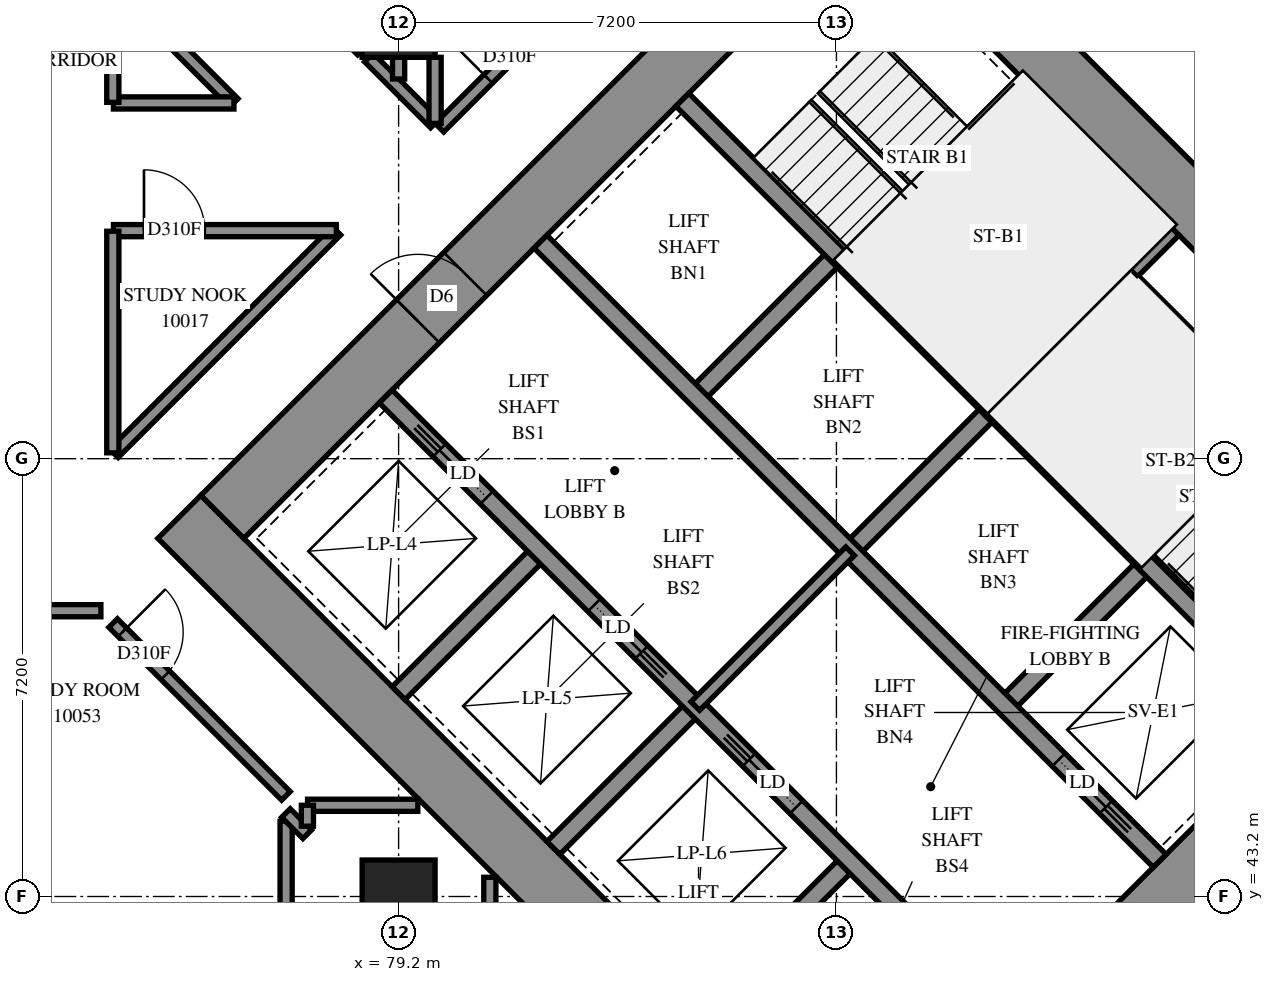
"""IFC4 building model, lengths in metres.
Left out: names, types, materials, properties, quantities, classifications, styles, units other than length and angle.
Written with IfcOpenShell. Run it as: python <this file> out.ifc"""

import sys

from ifc_helpers import new_model, si_unit, direction, frame, frame_2d, origin, origin_2d, place, context, subcontext, project, spatial, rectangle, extrude, element, fill, save


model = new_model("IFC4")
c1 = context("Model", 3, precision=1e-05, world=origin(), true_north=direction((0.0, 1.0)))
c2 = subcontext(c1, "Body", "Model", "MODEL_VIEW")
j1 = project(units=[si_unit("LENGTHUNIT", "METRE"), si_unit("PLANEANGLEUNIT", "RADIAN")], contexts=[c1])
p1 = place(None, origin())
s1 = spatial("IfcSite", under=j1, at=p1, CompositionType="ELEMENT")
p2 = place(p1, origin())
s2 = spatial("IfcBuilding", under=s1, at=p2, CompositionType="ELEMENT")
p3 = place(p2, frame((0.0, 0.0, 40.6)))
s3 = spatial("IfcBuildingStorey", under=s2, at=p3, CompositionType="ELEMENT", Elevation=40.6)
for number, where, z_axis, x_axis in (
    (1, (79.2, 43.2, 0.0), (0.0, 0.0, 1.0), (1.0, 0.0, 0.0)),
    (2, (79.2, 57.6, 0.0), (0.0, 0.0, 1.0), (1.0, 0.0, 0.0)),
):
    element("IfcColumn", number, at=place(p3, frame(where, z_axis=z_axis, x_axis=x_axis)), inside=s3, PredefinedType="COLUMN", context=c2, shape_type="SweptSolid", body=[
        extrude(rectangle(XDim=1.2, YDim=1.2, at=origin_2d()), origin(), (0.0, 0.0, 1.0), 3.1),
    ])
p4 = place(p3, frame((75.594, 49.443, -0.3), z_axis=(0.0, 0.0, 1.0), x_axis=(0.7071037324, -0.70710983, 0.0)))
e3 = element("IfcWall", 3, at=p4, inside=s3, PredefinedType="SHEAR", context=c2, shape_type="SweptSolid", body=[
    extrude(rectangle(XDim=16.4, YDim=1.0, at=frame_2d((8.2, 0.0))), origin(), (0.0, 0.0, 1.0), 2.7),
])
p5 = place(p3, frame((86.483, 60.333, -0.3), z_axis=(0.0, 0.0, 1.0), x_axis=(0.70710983, -0.7071037324, 0.0)))
e4 = element("IfcWall", 4, at=p5, inside=s3, PredefinedType="SHEAR", context=c2, shape_type="SweptSolid", body=[
    extrude(rectangle(XDim=16.4, YDim=1.0, at=frame_2d((8.2, 0.0))), origin(), (0.0, 0.0, 1.0), 2.7),
])
p6 = place(p5, frame((11.0, 0.0, 0.3)))
e5 = element("IfcOpeningElement", 5, at=p6, cuts=e4, PredefinedType="OPENING", context=c2, shape_type="SweptSolid", body=[
    extrude(rectangle(XDim=0.8, YDim=2.1, at=frame_2d((0.4, 1.05))), frame((0.0, 0.51, 0.0), z_axis=(0.0, -1.0, 0.0), x_axis=(1.0, 0.0, 0.0)), (0.0, 0.0, 1.0), 1.02),
])
p7 = place(p3, frame((76.301, 49.443, -0.3), z_axis=(0.0, 0.0, 1.0), x_axis=(0.7071067812, 0.7071067812, 0.0)))
e6 = element("IfcWall", 6, at=p7, inside=s3, PredefinedType="SHEAR", context=c2, shape_type="SweptSolid", body=[
    extrude(rectangle(XDim=14.4, YDim=1.0, at=frame_2d((7.2, 0.0))), origin(), (0.0, 0.0, 1.0), 2.7),
])
p8 = place(p7, frame((4.55, 0.0, 0.3)))
e7 = element("IfcOpeningElement", 7, at=p8, cuts=e6, PredefinedType="OPENING", context=c2, shape_type="SweptSolid", body=[
    extrude(rectangle(XDim=1.1, YDim=2.1, at=frame_2d((0.55, 1.05))), frame((0.0, 0.51, 0.0), z_axis=(0.0, -1.0, 0.0), x_axis=(1.0, 0.0, 0.0)), (0.0, 0.0, 1.0), 1.02),
])
p9 = place(p7, frame((11.35, 0.0, 0.3)))
e8 = element("IfcOpeningElement", 8, at=p9, cuts=e6, PredefinedType="OPENING", context=c2, shape_type="SweptSolid", body=[
    extrude(rectangle(XDim=1.1, YDim=2.1, at=frame_2d((0.55, 1.05))), frame((0.0, 0.51, 0.0), z_axis=(0.0, -1.0, 0.0), x_axis=(1.0, 0.0, 0.0)), (0.0, 0.0, 1.0), 1.02),
])
p10 = place(p3, frame((87.19, 38.554, -0.3), z_axis=(0.0, 0.0, 1.0), x_axis=(0.707103309, 0.7071102534, 0.0)))
e9 = element("IfcWall", 9, at=p10, inside=s3, PredefinedType="SHEAR", context=c2, shape_type="SweptSolid", body=[
    extrude(rectangle(XDim=14.4, YDim=1.0, at=frame_2d((7.2, 0.0))), origin(), (0.0, 0.0, 1.0), 2.7),
])
p11 = place(p10, frame((4.55, 0.0, 0.3)))
e10 = element("IfcOpeningElement", 10, at=p11, cuts=e9, PredefinedType="OPENING", context=c2, shape_type="SweptSolid", body=[
    extrude(rectangle(XDim=1.1, YDim=2.1, at=frame_2d((0.55, 1.05))), frame((0.0, 0.51, 0.0), z_axis=(0.0, -1.0, 0.0), x_axis=(1.0, 0.0, 0.0)), (0.0, 0.0, 1.0), 1.02),
])
p12 = place(p10, frame((11.35, 0.0, 0.3)))
e11 = element("IfcOpeningElement", 11, at=p12, cuts=e9, PredefinedType="OPENING", context=c2, shape_type="SweptSolid", body=[
    extrude(rectangle(XDim=1.1, YDim=2.1, at=frame_2d((0.55, 1.05))), frame((0.0, 0.51, 0.0), z_axis=(0.0, -1.0, 0.0), x_axis=(1.0, 0.0, 0.0)), (0.0, 0.0, 1.0), 1.02),
])
for number, where, z_axis, x_axis in (
    (12, (79.2, 46.544, 0.0), (0.0, 0.0, 1.0), (0.707, 0.707, 0.0)),
    (13, (84.079, 51.423, 0.0), (0.0, 0.0, 1.0), (0.707, 0.707, 0.0)),
):
    element("IfcWall", number, at=place(p3, frame(where, z_axis=z_axis, x_axis=x_axis)), inside=s3, PredefinedType="SOLIDWALL", context=c2, shape_type="SweptSolid", body=[
        extrude(rectangle(XDim=3.3, YDim=0.3, at=frame_2d((1.65, 0.0))), origin(), (0.0, 0.0, 1.0), 3.1),
    ])
p13 = place(p3, frame((81.746, 43.999, 0.0), z_axis=(0.0, 0.0, 1.0), x_axis=(0.7071067812, 0.7071067812, 0.0)))
e14 = element("IfcWall", 14, at=p13, inside=s3, PredefinedType="SOLIDWALL", context=c2, shape_type="SweptSolid", body=[
    extrude(rectangle(XDim=3.3, YDim=0.3, at=frame_2d((1.65, 0.0))), origin(), (0.0, 0.0, 1.0), 3.1),
])
p14 = place(p3, frame((86.625, 48.878, 0.0), z_axis=(0.0, 0.0, 1.0), x_axis=(0.7071067812, 0.7071067812, 0.0)))
e15 = element("IfcWall", 15, at=p14, inside=s3, PredefinedType="SOLIDWALL", context=c2, shape_type="SweptSolid", body=[
    extrude(rectangle(XDim=3.3, YDim=0.3, at=frame_2d((1.65, 0.0))), origin(), (0.0, 0.0, 1.0), 3.1),
])
p15 = place(p3, frame((84.291, 41.453, 0.0), z_axis=(0.0, 0.0, 1.0), x_axis=(0.7071067812, 0.7071067812, 0.0)))
e16 = element("IfcWall", 16, at=p15, inside=s3, PredefinedType="SOLIDWALL", context=c2, shape_type="SweptSolid", body=[
    extrude(rectangle(XDim=3.3, YDim=0.3, at=frame_2d((1.65, 0.0))), origin(), (0.0, 0.0, 1.0), 3.1),
])
p16 = place(p3, frame((89.17, 46.332, 0.0), z_axis=(0.0, 0.0, 1.0), x_axis=(0.7071067812, 0.7071067812, 0.0)))
e17 = element("IfcWall", 17, at=p16, inside=s3, PredefinedType="SOLIDWALL", context=c2, shape_type="SweptSolid", body=[
    extrude(rectangle(XDim=3.3, YDim=0.3, at=frame_2d((1.65, 0.0))), origin(), (0.0, 0.0, 1.0), 3.1),
])
p17 = place(p3, frame((78.988, 51.423, 0.0), z_axis=(0.0, 0.0, 1.0), x_axis=(0.7071067812, -0.7071067812, 0.0)))
e18 = element("IfcWall", 18, at=p17, inside=s3, PredefinedType="SOLIDWALL", context=c2, shape_type="SweptSolid", body=[
    extrude(rectangle(XDim=14.4, YDim=0.3, at=frame_2d((7.2, 0.0))), origin(), (0.0, 0.0, 1.0), 3.1),
])
p18 = place(p17, frame((1.25, 0.0, 0.0)))
e19 = element("IfcOpeningElement", 19, at=p18, cuts=e18, PredefinedType="OPENING", context=c2, shape_type="SweptSolid", body=[
    extrude(rectangle(XDim=1.1, YDim=2.1, at=frame_2d((0.55, 1.05))), frame((0.0, 0.16, 0.0), z_axis=(0.0, -1.0, 0.0), x_axis=(1.0, 0.0, 0.0)), (0.0, 0.0, 1.0), 0.32),
])
p19 = place(p17, frame((4.85, 0.0, 0.0)))
e20 = element("IfcOpeningElement", 20, at=p19, cuts=e18, PredefinedType="OPENING", context=c2, shape_type="SweptSolid", body=[
    extrude(rectangle(XDim=1.1, YDim=2.1, at=frame_2d((0.55, 1.05))), frame((0.0, 0.16, 0.0), z_axis=(0.0, -1.0, 0.0), x_axis=(1.0, 0.0, 0.0)), (0.0, 0.0, 1.0), 0.32),
])
p20 = place(p17, frame((8.45, 0.0, 0.0)))
e21 = element("IfcOpeningElement", 21, at=p20, cuts=e18, PredefinedType="OPENING", context=c2, shape_type="SweptSolid", body=[
    extrude(rectangle(XDim=1.1, YDim=2.1, at=frame_2d((0.55, 1.05))), frame((0.0, 0.16, 0.0), z_axis=(0.0, -1.0, 0.0), x_axis=(1.0, 0.0, 0.0)), (0.0, 0.0, 1.0), 0.32),
])
p21 = place(p17, frame((12.05, 0.0, 0.0)))
e22 = element("IfcOpeningElement", 22, at=p21, cuts=e18, PredefinedType="OPENING", context=c2, shape_type="SweptSolid", body=[
    extrude(rectangle(XDim=1.1, YDim=2.1, at=frame_2d((0.55, 1.05))), frame((0.0, 0.16, 0.0), z_axis=(0.0, -1.0, 0.0), x_axis=(1.0, 0.0, 0.0)), (0.0, 0.0, 1.0), 0.32),
])
p22 = place(p3, frame((81.534, 53.969, 0.0), z_axis=(0.0, 0.0, 1.0), x_axis=(0.707103309, -0.7071102534, 0.0)))
e23 = element("IfcWall", 23, at=p22, inside=s3, PredefinedType="SOLIDWALL", context=c2, shape_type="SweptSolid", body=[
    extrude(rectangle(XDim=14.4, YDim=0.3, at=frame_2d((7.2, 0.0))), origin(), (0.0, 0.0, 1.0), 3.1),
])
p23 = place(p22, frame((12.05, 0.0, 0.0)))
e24 = element("IfcOpeningElement", 24, at=p23, cuts=e23, PredefinedType="OPENING", context=c2, shape_type="SweptSolid", body=[
    extrude(rectangle(XDim=1.1, YDim=2.1, at=frame_2d((0.55, 1.05))), frame((0.0, 0.16, 0.0), z_axis=(0.0, -1.0, 0.0), x_axis=(1.0, 0.0, 0.0)), (0.0, 0.0, 1.0), 0.32),
])
for number, where, z_axis, x_axis in (
    (25, (83.867, 56.302, 0.0), (0.0, 0.0, 1.0), (0.707, -0.707, 0.0)),
    (26, (88.958, 51.211, 0.0), (0.0, 0.0, 1.0), (0.707, -0.707, 0.0)),
):
    element("IfcWall", number, at=place(p3, frame(where, z_axis=z_axis, x_axis=x_axis)), inside=s3, PredefinedType="SOLIDWALL", context=c2, shape_type="SweptSolid", body=[
        extrude(rectangle(XDim=7.2, YDim=0.3, at=frame_2d((3.6, 0.0))), origin(), (0.0, 0.0, 1.0), 3.1),
    ])
p24 = place(p3, frame((88.958, 51.211, 0.0), z_axis=(0.0, 0.0, 1.0), x_axis=(0.7071067812, 0.7071067812, 0.0)))
e27 = element("IfcWall", 27, at=p24, inside=s3, PredefinedType="SOLIDWALL", context=c2, shape_type="SweptSolid", body=[
    extrude(rectangle(XDim=4.2, YDim=0.3, at=frame_2d((2.1, 0.0))), origin(), (0.0, 0.0, 1.0), 3.1),
])
p25 = place(p3, frame((91.313, 53.354, 0.0), z_axis=(0.0, 0.0, 1.0), x_axis=(0.7071140275, -0.7070995348, 0.0)))
e28 = element("IfcWall", 28, at=p25, inside=s3, PredefinedType="PARTITIONING", context=c2, shape_type="SweptSolid", body=[
    extrude(rectangle(XDim=6.9, YDim=0.15, at=frame_2d((3.45, 0.0))), origin(), (0.0, 0.0, 1.0), 3.1),
])
p26 = place(p3, frame((84.079, 46.332, 0.0), z_axis=(0.0, 0.0, 1.0), x_axis=(0.7071067812, 0.7071067812, 0.0)))
e29 = element("IfcWall", 29, at=p26, inside=s3, PredefinedType="PARTITIONING", context=c2, shape_type="SweptSolid", body=[
    extrude(rectangle(XDim=3.6, YDim=0.2, at=frame_2d((1.8, 0.0))), origin(), (0.0, 0.0, 1.0), 3.1),
])
p27 = place(p3, frame((55.1, 47.9, 0.0), z_axis=(0.0, 0.0, 1.0), x_axis=(1.0, 0.0, 0.0)))
e30 = element("IfcWall", 30, at=p27, inside=s3, PredefinedType="PARTITIONING", context=c2, shape_type="SweptSolid", body=[
    extrude(rectangle(XDim=19.204, YDim=0.2, at=frame_2d((9.602, 0.0))), origin(), (0.0, 0.0, 1.0), 3.1),
])
p28 = place(p27, frame((6.399, 0.0, 0.0)))
e31 = element("IfcOpeningElement", 31, at=p28, cuts=e30, PredefinedType="OPENING", context=c2, shape_type="SweptSolid", body=[
    extrude(rectangle(XDim=0.9, YDim=2.1, at=frame_2d((0.45, 1.05))), frame((0.0, 0.11, 0.0), z_axis=(0.0, -1.0, 0.0), x_axis=(1.0, 0.0, 0.0)), (0.0, 0.0, 1.0), 0.22),
])
p29 = place(p27, frame((13.599, 0.0, 0.0)))
e32 = element("IfcOpeningElement", 32, at=p29, cuts=e30, PredefinedType="OPENING", context=c2, shape_type="SweptSolid", body=[
    extrude(rectangle(XDim=0.9, YDim=2.1, at=frame_2d((0.45, 1.05))), frame((0.0, 0.11, 0.0), z_axis=(0.0, -1.0, 0.0), x_axis=(1.0, 0.0, 0.0)), (0.0, 0.0, 1.0), 0.22),
])
p30 = place(p3, frame((79.871, 55.843, 0.0), z_axis=(0.0, 0.0, 1.0), x_axis=(0.7071067812, 0.7071067812, 0.0)))
e33 = element("IfcWall", 33, at=p30, inside=s3, PredefinedType="PARTITIONING", context=c2, shape_type="SweptSolid", body=[
    extrude(rectangle(XDim=9.85, YDim=0.2, at=frame_2d((4.925, 0.0))), origin(), (0.0, 0.0, 1.0), 3.1),
])
p31 = place(p30, frame((1.135, 0.0, 0.0)))
e34 = element("IfcOpeningElement", 34, at=p31, cuts=e33, PredefinedType="OPENING", context=c2, shape_type="SweptSolid", body=[
    extrude(rectangle(XDim=1.0, YDim=2.1, at=frame_2d((0.5, 1.05))), frame((0.0, 0.11, 0.0), z_axis=(0.0, -1.0, 0.0), x_axis=(1.0, 0.0, 0.0)), (0.0, 0.0, 1.0), 0.22),
])
p32 = place(p3, frame((89.451, 60.189, 0.0), z_axis=(0.0, 0.0, 1.0), x_axis=(0.7071796965, -0.7070338583, 0.0)))
e35 = element("IfcWall", 35, at=p32, inside=s3, PredefinedType="PARTITIONING", context=c2, shape_type="SweptSolid", body=[
    extrude(rectangle(XDim=9.6, YDim=0.2, at=frame_2d((4.8, 0.0))), origin(), (0.0, 0.0, 1.0), 3.1),
])
p33 = place(p32, frame((7.315, 0.0, 0.0)))
e36 = element("IfcOpeningElement", 36, at=p33, cuts=e35, PredefinedType="OPENING", context=c2, shape_type="SweptSolid", body=[
    extrude(rectangle(XDim=0.9, YDim=2.1, at=frame_2d((0.45, 1.05))), frame((0.0, 0.11, 0.0), z_axis=(0.0, -1.0, 0.0), x_axis=(1.0, 0.0, 0.0)), (0.0, 0.0, 1.0), 0.22),
])
p34 = place(p3, frame((74.773, 60.935, 0.0), z_axis=(0.0, 0.0, 1.0), x_axis=(0.7071067812, -0.7071067812, 0.0)))
e37 = element("IfcWall", 37, at=p34, inside=s3, PredefinedType="PARTITIONING", context=c2, shape_type="SweptSolid", body=[
    extrude(rectangle(XDim=5.408, YDim=0.2, at=frame_2d((2.704, 0.0))), origin(), (0.0, 0.0, 1.0), 3.1),
])
p35 = place(p3, frame((74.517, 50.489, 0.0), z_axis=(0.0, 0.0, 1.0), x_axis=(0.7071067812, 0.7071067812, 0.0)))
e38 = element("IfcWall", 38, at=p35, inside=s3, PredefinedType="PARTITIONING", context=c2, shape_type="SweptSolid", body=[
    extrude(rectangle(XDim=5.176, YDim=0.2, at=frame_2d((2.588, 0.0))), origin(), (0.0, 0.0, 1.0), 3.1),
])
p36 = place(p3, frame((74.505, 47.697, 0.0), z_axis=(0.0, 0.0, 1.0), x_axis=(0.7071067812, -0.7071067812, 0.0)))
e39 = element("IfcWall", 39, at=p36, inside=s3, PredefinedType="PARTITIONING", context=c2, shape_type="SweptSolid", body=[
    extrude(rectangle(XDim=4.019, YDim=0.2, at=frame_2d((2.01, 0.0))), origin(), (0.0, 0.0, 1.0), 3.1),
])
p37 = place(p36, frame((0.215, 0.0, 0.0)))
e40 = element("IfcOpeningElement", 40, at=p37, cuts=e39, PredefinedType="OPENING", context=c2, shape_type="SweptSolid", body=[
    extrude(rectangle(XDim=1.0, YDim=2.1, at=frame_2d((0.5, 1.05))), frame((0.0, 0.11, 0.0), z_axis=(0.0, -1.0, 0.0), x_axis=(1.0, 0.0, 0.0)), (0.0, 0.0, 1.0), 0.22),
])
p38 = place(p3, frame((74.51, 54.15, 0.0), z_axis=(0.0, 0.0, 1.0), x_axis=(1.0, 0.0, 0.0)))
e41 = element("IfcWall", 41, at=p38, inside=s3, PredefinedType="PARTITIONING", context=c2, shape_type="SweptSolid", body=[
    extrude(rectangle(XDim=3.666, YDim=0.2, at=frame_2d((1.833, 0.0))), origin(), (0.0, 0.0, 1.0), 3.1),
])
p39 = place(p38, frame((0.502, 0.0, 0.0)))
e42 = element("IfcOpeningElement", 42, at=p39, cuts=e41, PredefinedType="OPENING", context=c2, shape_type="SweptSolid", body=[
    extrude(rectangle(XDim=1.0, YDim=2.1, at=frame_2d((0.5, 1.05))), frame((0.0, 0.11, 0.0), z_axis=(0.0, -1.0, 0.0), x_axis=(1.0, 0.0, 0.0)), (0.0, 0.0, 1.0), 0.22),
])
p40 = place(p3, frame((74.5, 50.496, 0.0), z_axis=(0.0, 0.0, 1.0), x_axis=(0.0, 1.0, 0.0)))
e43 = element("IfcWall", 43, at=p40, inside=s3, PredefinedType="PARTITIONING", context=c2, shape_type="SweptSolid", body=[
    extrude(rectangle(XDim=3.644, YDim=0.2, at=frame_2d((1.822, 0.0))), origin(), (0.0, 0.0, 1.0), 3.1),
])
p41 = place(p3, frame((77.35, 41.139, 0.0), z_axis=(0.0, 0.0, 1.0), x_axis=(0.0, 1.0, 0.0)))
e44 = element("IfcWall", 44, at=p41, inside=s3, PredefinedType="PARTITIONING", context=c2, shape_type="SweptSolid", body=[
    extrude(rectangle(XDim=3.297, YDim=0.2, at=frame_2d((1.648, 0.0))), origin(), (0.0, 0.0, 1.0), 3.1),
])
p42 = place(p3, frame((74.697, 58.041, 0.0), z_axis=(0.0, 0.0, 1.0), x_axis=(0.7071067812, -0.7071067812, 0.0)))
e45 = element("IfcWall", 45, at=p42, inside=s3, PredefinedType="PARTITIONING", context=c2, shape_type="SweptSolid", body=[
    extrude(rectangle(XDim=2.534, YDim=0.2, at=frame_2d((1.267, 0.0))), origin(), (0.0, 0.0, 1.0), 3.1),
])
p43 = place(p3, frame((74.51, 56.25, 0.0), z_axis=(0.0, 0.0, 1.0), x_axis=(1.0, 0.0, 0.0)))
e46 = element("IfcWall", 46, at=p43, inside=s3, PredefinedType="PARTITIONING", context=c2, shape_type="SweptSolid", body=[
    extrude(rectangle(XDim=1.982, YDim=0.2, at=frame_2d((0.991, 0.0))), origin(), (0.0, 0.0, 1.0), 3.1),
])
p44 = place(p3, frame((74.5, 56.26, 0.0), z_axis=(0.0, 0.0, 1.0), x_axis=(0.0, 1.0, 0.0)))
e47 = element("IfcWall", 47, at=p44, inside=s3, PredefinedType="PARTITIONING", context=c2, shape_type="SweptSolid", body=[
    extrude(rectangle(XDim=1.96, YDim=0.2, at=frame_2d((0.98, 0.0))), origin(), (0.0, 0.0, 1.0), 3.1),
])
for number, where, z_axis, x_axis in (
    (48, (77.702, 44.7, 0.0), (0.0, 0.0, 1.0), (1.0, 0.0, 0.0)),
    (49, (80.7, 41.702, 0.0), (0.0, 0.0, 1.0), (0.0, 1.0, 0.0)),
):
    element("IfcWall", number, at=place(p3, frame(where, z_axis=z_axis, x_axis=x_axis)), inside=s3, PredefinedType="PARTITIONING", context=c2, shape_type="SweptSolid", body=[
        extrude(rectangle(XDim=1.814, YDim=0.2, at=frame_2d((0.907, 0.0))), origin(), (0.0, 0.0, 1.0), 3.1),
    ])
p45 = place(p3, frame((78.711, 56.997, 0.0), z_axis=(0.0, 0.0, 1.0), x_axis=(0.7071067812, -0.7071067812, 0.0)))
e50 = element("IfcWall", 50, at=p45, inside=s3, PredefinedType="PARTITIONING", context=c2, shape_type="SweptSolid", body=[
    extrude(rectangle(XDim=1.536, YDim=0.2, at=frame_2d((0.768, 0.0))), origin(), (0.0, 0.0, 1.0), 3.1),
])
p46 = place(p3, frame((79.8, 55.914, 0.0), z_axis=(0.0, 0.0, 1.0), x_axis=(0.0, 1.0, 0.0)))
e51 = element("IfcWall", 51, at=p46, inside=s3, PredefinedType="PARTITIONING", context=c2, shape_type="SweptSolid", body=[
    extrude(rectangle(XDim=1.086, YDim=0.2, at=frame_2d((0.543, 0.0))), origin(), (0.0, 0.0, 1.0), 3.1),
])
p47 = place(p3, frame((77.347, 44.573, 0.0), z_axis=(0.0, 0.0, 1.0), x_axis=(0.7071067812, -0.7071067812, 0.0)))
e52 = element("IfcWall", 52, at=p47, inside=s3, PredefinedType="PARTITIONING", context=c2, shape_type="SweptSolid", body=[
    extrude(rectangle(XDim=0.495, YDim=0.2, at=frame_2d((0.247, 0.0))), origin(), (0.0, 0.0, 1.0), 3.1),
])
p48 = place(p3, frame((79.2, 56.644, 0.0), z_axis=(0.0, 0.0, 1.0), x_axis=(0.0, 1.0, 0.0)))
e53 = element("IfcWall", 53, at=p48, inside=s3, PredefinedType="PARTITIONING", context=c2, shape_type="SweptSolid", body=[
    extrude(rectangle(XDim=0.356, YDim=0.2, at=frame_2d((0.178, 0.0))), origin(), (0.0, 0.0, 1.0), 3.1),
])
p49 = place(p3, frame((77.7, 44.356, 0.0), z_axis=(0.0, 0.0, 1.0), x_axis=(0.0, 1.0, 0.0)))
e54 = element("IfcWall", 54, at=p49, inside=s3, PredefinedType="PARTITIONING", context=c2, shape_type="SweptSolid", body=[
    extrude(rectangle(XDim=0.344, YDim=0.2, at=frame_2d((0.172, 0.0))), origin(), (0.0, 0.0, 1.0), 3.1),
])
p50 = place(p8, origin())
e55 = element("IfcDoor", 55, at=p50, inside=s3, OperationType="DOUBLE_DOOR_SINGLE_SWING", PredefinedType="DOOR", context=c2, shape_type="SweptSolid", body=[
    extrude(rectangle(XDim=1.1, YDim=2.1, at=frame_2d((0.55, 1.05))), frame((0.0, 0.025, 0.0), z_axis=(0.0, -1.0, 0.0), x_axis=(1.0, 0.0, 0.0)), (0.0, 0.0, 1.0), 0.05),
])
fill(e7, e55)
p51 = place(p18, origin())
e56 = element("IfcDoor", 56, at=p51, inside=s3, OperationType="SLIDING_TO_LEFT", PredefinedType="DOOR", context=c2, shape_type="SweptSolid", body=[
    extrude(rectangle(XDim=1.1, YDim=2.1, at=frame_2d((0.55, 1.05))), frame((0.0, 0.025, 0.0), z_axis=(0.0, -1.0, 0.0), x_axis=(1.0, 0.0, 0.0)), (0.0, 0.0, 1.0), 0.05),
])
fill(e19, e56)
p52 = place(p19, origin())
e57 = element("IfcDoor", 57, at=p52, inside=s3, OperationType="SLIDING_TO_RIGHT", PredefinedType="DOOR", context=c2, shape_type="SweptSolid", body=[
    extrude(rectangle(XDim=1.1, YDim=2.1, at=frame_2d((0.55, 1.05))), frame((0.0, 0.025, 0.0), z_axis=(0.0, -1.0, 0.0), x_axis=(1.0, 0.0, 0.0)), (0.0, 0.0, 1.0), 0.05),
])
fill(e20, e57)
p53 = place(p20, origin())
e58 = element("IfcDoor", 58, at=p53, inside=s3, OperationType="SLIDING_TO_LEFT", PredefinedType="DOOR", context=c2, shape_type="SweptSolid", body=[
    extrude(rectangle(XDim=1.1, YDim=2.1, at=frame_2d((0.55, 1.05))), frame((0.0, 0.025, 0.0), z_axis=(0.0, -1.0, 0.0), x_axis=(1.0, 0.0, 0.0)), (0.0, 0.0, 1.0), 0.05),
])
fill(e21, e58)
p54 = place(p23, origin())
e59 = element("IfcDoor", 59, at=p54, inside=s3, OperationType="SLIDING_TO_RIGHT", PredefinedType="DOOR", context=c2, shape_type="SweptSolid", body=[
    extrude(rectangle(XDim=1.1, YDim=2.1, at=frame_2d((0.55, 1.05))), frame((0.0, 0.025, 0.0), z_axis=(0.0, -1.0, 0.0), x_axis=(1.0, 0.0, 0.0)), (0.0, 0.0, 1.0), 0.05),
])
fill(e24, e59)
p55 = place(p39, origin())
e60 = element("IfcDoor", 60, at=p55, inside=s3, OperationType="SINGLE_SWING_RIGHT", PredefinedType="DOOR", context=c2, shape_type="SweptSolid", body=[
    extrude(rectangle(XDim=1.0, YDim=2.1, at=frame_2d((0.5, 1.05))), frame((0.0, 0.025, 0.0), z_axis=(0.0, -1.0, 0.0), x_axis=(1.0, 0.0, 0.0)), (0.0, 0.0, 1.0), 0.05),
])
fill(e42, e60)
p56 = place(p37, origin())
e61 = element("IfcDoor", 61, at=p56, inside=s3, OperationType="SINGLE_SWING_LEFT", PredefinedType="DOOR", context=c2, shape_type="SweptSolid", body=[
    extrude(rectangle(XDim=1.0, YDim=2.1, at=frame_2d((0.5, 1.05))), frame((0.0, 0.025, 0.0), z_axis=(0.0, -1.0, 0.0), x_axis=(1.0, 0.0, 0.0)), (0.0, 0.0, 1.0), 0.05),
])
fill(e40, e61)
p57 = place(p31, origin())
e62 = element("IfcDoor", 62, at=p57, inside=s3, OperationType="SINGLE_SWING_RIGHT", PredefinedType="DOOR", context=c2, shape_type="SweptSolid", body=[
    extrude(rectangle(XDim=1.0, YDim=2.1, at=frame_2d((0.5, 1.05))), frame((0.0, 0.025, 0.0), z_axis=(0.0, -1.0, 0.0), x_axis=(1.0, 0.0, 0.0)), (0.0, 0.0, 1.0), 0.05),
])
fill(e34, e62)
save(model, sys.argv[1])
